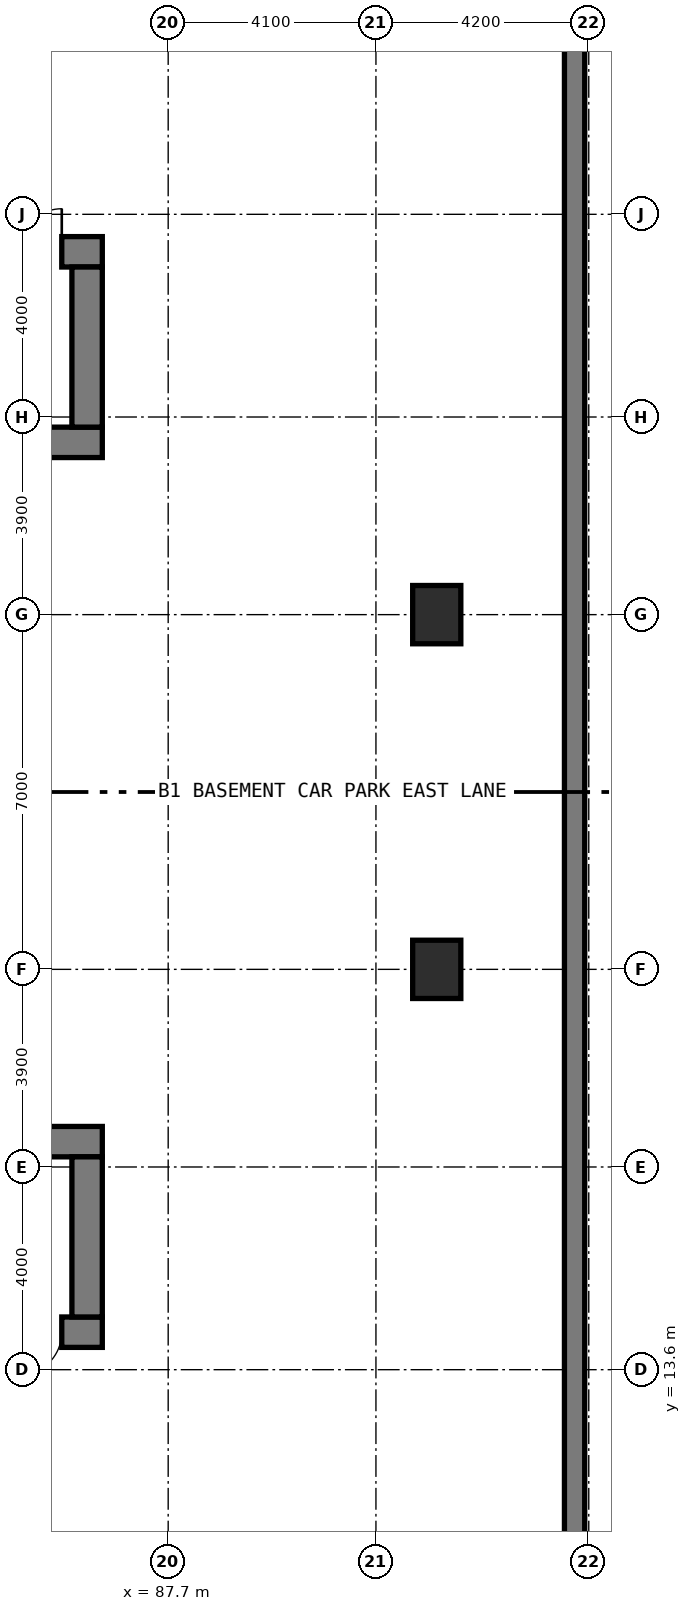
"""IFC4 building model, lengths in metres.
Left out: names, types, materials, properties, quantities, classifications, styles, units other than length and angle.
Written with IfcOpenShell. Run it as: python <this file> out.ifc"""

import sys

from ifc_helpers import new_model, si_unit, direction, frame, frame_2d, origin, origin_2d, place, context, subcontext, project, spatial, rectangle, extrude, element, fill, save


model = new_model("IFC4")
c1 = context("Model", 3, precision=1e-05, world=origin(), true_north=direction((0.0, 1.0)))
c2 = subcontext(c1, "Body", "Model", "MODEL_VIEW")
j1 = project(units=[si_unit("LENGTHUNIT", "METRE"), si_unit("PLANEANGLEUNIT", "RADIAN")], contexts=[c1])
p1 = place(None, origin())
s1 = spatial("IfcSite", under=j1, at=p1, CompositionType="ELEMENT")
p2 = place(p1, origin())
s2 = spatial("IfcBuilding", under=s1, at=p2, CompositionType="ELEMENT")
p3 = place(p2, frame((0.0, 0.0, -4.2)))
s3 = spatial("IfcBuildingStorey", under=s2, at=p3, CompositionType="ELEMENT", Elevation=-4.2)
p4 = place(p3, frame((95.72, 0.48, 0.0), z_axis=(0.0, 0.0, 1.0), x_axis=(0.0, 1.0, 0.0)))
e1 = element("IfcWall", 1, at=p4, inside=s3, PredefinedType="USERDEFINED", context=c2, shape_type="SweptSolid", body=[
    extrude(rectangle(XDim=49.04, YDim=0.4, at=frame_2d((24.52, 0.0))), origin(), (0.0, 0.0, 1.0), 4.2),
])
p5 = place(p3, frame((67.8, 31.9, 0.0), z_axis=(0.0, 0.0, 1.0), x_axis=(1.0, 0.0, 0.0)))
e2 = element("IfcWall", 2, at=p5, inside=s3, PredefinedType="SHEAR", context=c2, shape_type="SweptSolid", body=[
    extrude(rectangle(XDim=18.6, YDim=0.6, at=frame_2d((9.3, 0.0))), origin(), (0.0, 0.0, 1.0), 4.2),
])
p6 = place(p3, frame((67.8, 35.66, 0.0), z_axis=(0.0, 0.0, 1.0), x_axis=(1.0, 0.0, 0.0)))
e3 = element("IfcWall", 3, at=p6, inside=s3, PredefinedType="SHEAR", context=c2, shape_type="SweptSolid", body=[
    extrude(rectangle(XDim=18.6, YDim=0.6, at=frame_2d((9.3, 0.0))), origin(), (0.0, 0.0, 1.0), 4.2),
])
p7 = place(p6, frame((9.35, 0.0, 0.0)))
e4 = element("IfcOpeningElement", 4, at=p7, cuts=e3, PredefinedType="OPENING", context=c2, shape_type="SweptSolid", body=[
    extrude(rectangle(XDim=1.2, YDim=2.15, at=frame_2d((0.6, 1.075))), frame((0.0, 0.31, 0.0), z_axis=(0.0, -1.0, 0.0), x_axis=(1.0, 0.0, 0.0)), (0.0, 0.0, 1.0), 0.62),
])
p8 = place(p6, frame((16.95, 0.0, 0.0)))
e5 = element("IfcOpeningElement", 5, at=p8, cuts=e3, PredefinedType="OPENING", context=c2, shape_type="SweptSolid", body=[
    extrude(rectangle(XDim=0.85, YDim=2.1, at=frame_2d((0.425, 1.05))), frame((0.0, 0.31, 0.0), z_axis=(0.0, -1.0, 0.0), x_axis=(1.0, 0.0, 0.0)), (0.0, 0.0, 1.0), 0.62),
])
p9 = place(p3, frame((86.1, 32.2, 0.0), z_axis=(0.0, 0.0, 1.0), x_axis=(0.0, 1.0, 0.0)))
e6 = element("IfcWall", 6, at=p9, inside=s3, PredefinedType="SHEAR", context=c2, shape_type="SweptSolid", body=[
    extrude(rectangle(XDim=3.16, YDim=0.6, at=frame_2d((1.58, 0.0))), origin(), (0.0, 0.0, 1.0), 4.2),
])
p10 = place(p3, frame((67.8, 14.34, 0.0), z_axis=(0.0, 0.0, 1.0), x_axis=(1.0, 0.0, 0.0)))
e7 = element("IfcWall", 7, at=p10, inside=s3, PredefinedType="SHEAR", context=c2, shape_type="SweptSolid", body=[
    extrude(rectangle(XDim=18.6, YDim=0.6, at=frame_2d((9.3, 0.0))), origin(), (0.0, 0.0, 1.0), 4.2),
])
p11 = place(p10, frame((9.35, 0.0, 0.0)))
e8 = element("IfcOpeningElement", 8, at=p11, cuts=e7, PredefinedType="OPENING", context=c2, shape_type="SweptSolid", body=[
    extrude(rectangle(XDim=1.2, YDim=2.15, at=frame_2d((0.6, 1.075))), frame((0.0, 0.31, 0.0), z_axis=(0.0, -1.0, 0.0), x_axis=(1.0, 0.0, 0.0)), (0.0, 0.0, 1.0), 0.62),
])
p12 = place(p10, frame((16.95, 0.0, 0.0)))
e9 = element("IfcOpeningElement", 9, at=p12, cuts=e7, PredefinedType="OPENING", context=c2, shape_type="SweptSolid", body=[
    extrude(rectangle(XDim=0.85, YDim=2.1, at=frame_2d((0.425, 1.05))), frame((0.0, 0.31, 0.0), z_axis=(0.0, -1.0, 0.0), x_axis=(1.0, 0.0, 0.0)), (0.0, 0.0, 1.0), 0.62),
])
p13 = place(p10, frame((12.55, 0.0, 0.0)))
e10 = element("IfcOpeningElement", 10, at=p13, cuts=e7, PredefinedType="OPENING", context=c2, shape_type="SweptSolid", body=[
    extrude(rectangle(XDim=1.1, YDim=2.15, at=frame_2d((0.55, 1.075))), frame((0.0, 0.31, 0.0), z_axis=(0.0, -1.0, 0.0), x_axis=(1.0, 0.0, 0.0)), (0.0, 0.0, 1.0), 0.62),
])
p14 = place(p10, frame((14.15, 0.0, 0.0)))
e11 = element("IfcOpeningElement", 11, at=p14, cuts=e7, PredefinedType="OPENING", context=c2, shape_type="SweptSolid", body=[
    extrude(rectangle(XDim=1.1, YDim=2.15, at=frame_2d((0.55, 1.075))), frame((0.0, 0.31, 0.0), z_axis=(0.0, -1.0, 0.0), x_axis=(1.0, 0.0, 0.0)), (0.0, 0.0, 1.0), 0.62),
])
p15 = place(p3, frame((67.8, 18.1, 0.0), z_axis=(0.0, 0.0, 1.0), x_axis=(1.0, 0.0, 0.0)))
e12 = element("IfcWall", 12, at=p15, inside=s3, PredefinedType="SHEAR", context=c2, shape_type="SweptSolid", body=[
    extrude(rectangle(XDim=18.6, YDim=0.6, at=frame_2d((9.3, 0.0))), origin(), (0.0, 0.0, 1.0), 4.2),
])
p16 = place(p3, frame((86.1, 14.64, 0.0), z_axis=(0.0, 0.0, 1.0), x_axis=(0.0, 1.0, 0.0)))
e13 = element("IfcWall", 13, at=p16, inside=s3, PredefinedType="SHEAR", context=c2, shape_type="SweptSolid", body=[
    extrude(rectangle(XDim=3.16, YDim=0.6, at=frame_2d((1.58, 0.0))), origin(), (0.0, 0.0, 1.0), 4.2),
])
for number, where, z_axis, x_axis in (
    (14, (93.0, 21.5, 0.0), (0.0, 0.0, 1.0), (1.0, 0.0, 0.0)),
    (15, (93.0, 28.5, 0.0), (0.0, 0.0, 1.0), (1.0, 0.0, 0.0)),
):
    element("IfcColumn", number, at=place(p3, frame(where, z_axis=z_axis, x_axis=x_axis)), inside=s3, PredefinedType="COLUMN", context=c2, shape_type="SweptSolid", body=[
        extrude(rectangle(XDim=0.95, YDim=1.15, at=origin_2d()), origin(), (0.0, 0.0, 1.0), 4.2),
    ])
p17 = place(p8, origin())
e16 = element("IfcDoor", 16, at=p17, inside=s3, OperationType="SINGLE_SWING_RIGHT", PredefinedType="DOOR", context=c2, shape_type="SweptSolid", body=[
    extrude(rectangle(XDim=0.85, YDim=2.1, at=frame_2d((0.425, 1.05))), frame((0.0, 0.025, 0.0), z_axis=(0.0, -1.0, 0.0), x_axis=(1.0, 0.0, 0.0)), (0.0, 0.0, 1.0), 0.05),
])
fill(e5, e16)
p18 = place(p12, frame((0.85, 0.0, 0.0), z_axis=(0.0, 0.0, 1.0), x_axis=(-1.0, 0.0, 0.0)))
e17 = element("IfcDoor", 17, at=p18, inside=s3, OperationType="SINGLE_SWING_RIGHT", PredefinedType="DOOR", context=c2, shape_type="SweptSolid", body=[
    extrude(rectangle(XDim=0.85, YDim=2.1, at=frame_2d((0.425, 1.05))), frame((0.0, 0.025, 0.0), z_axis=(0.0, -1.0, 0.0), x_axis=(1.0, 0.0, 0.0)), (0.0, 0.0, 1.0), 0.05),
])
fill(e9, e17)
save(model, sys.argv[1])
